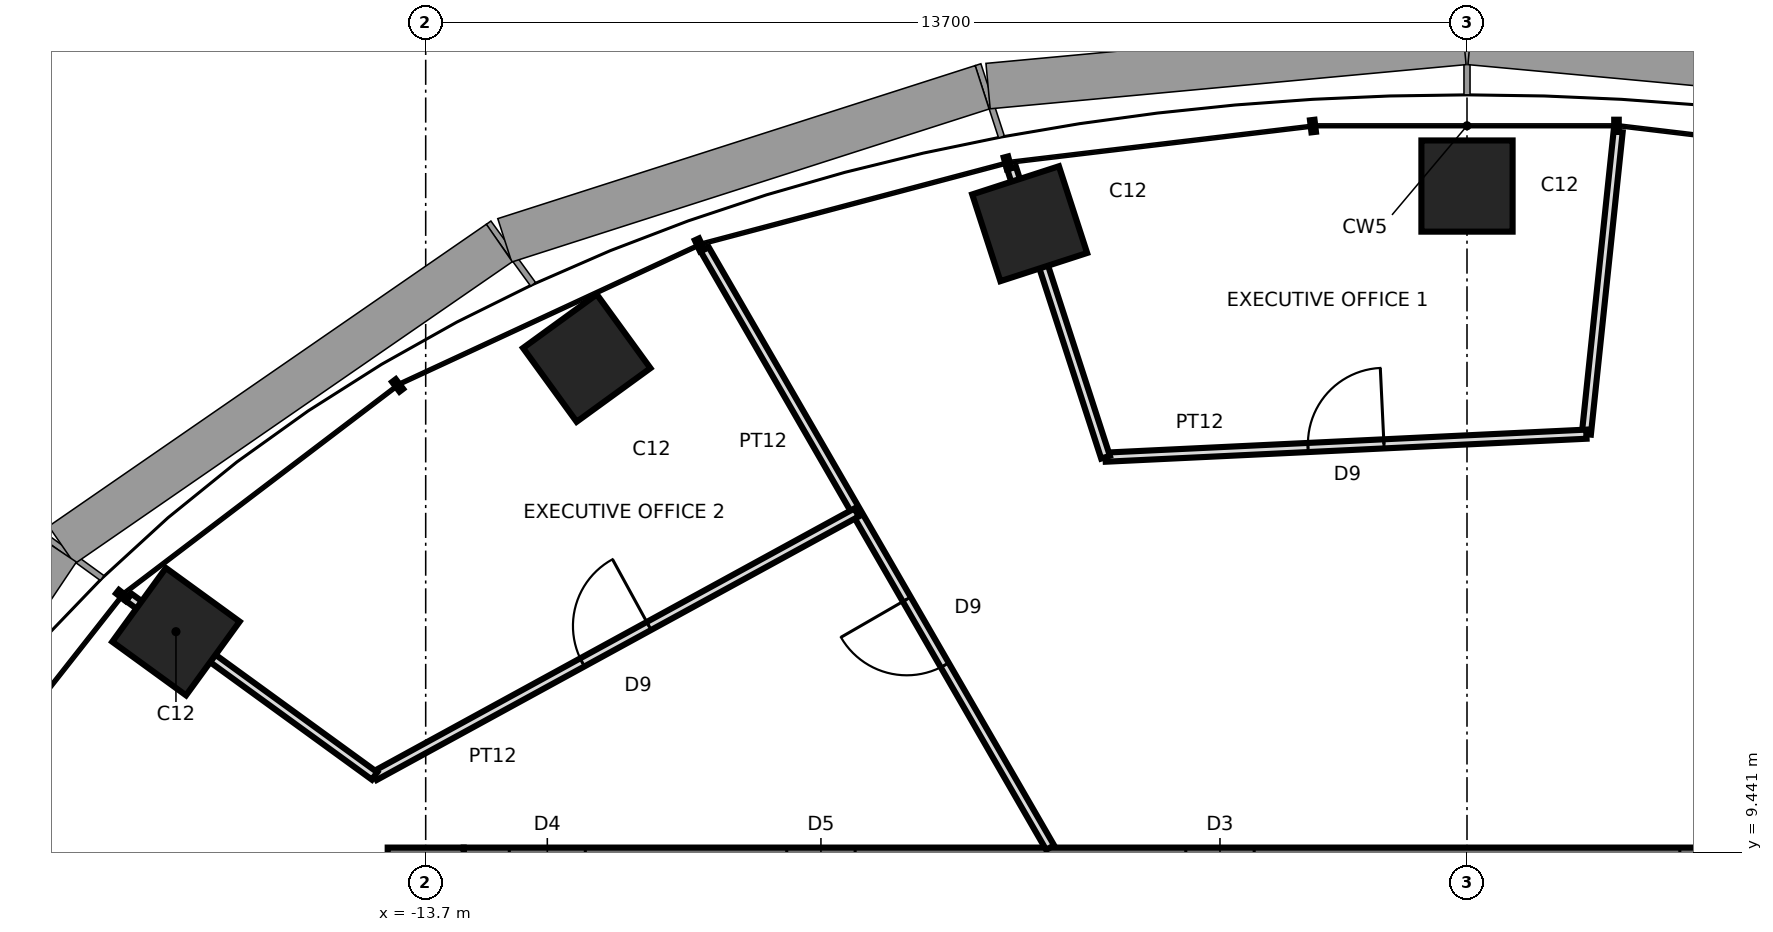
"""IFC4 building model, lengths in metres.
Left out: names, types, materials, properties, quantities, classifications, styles, units other than length and angle.
Written with IfcOpenShell. Run it as: python <this file> out.ifc"""

import sys

from ifc_helpers import new_model, si_unit, direction, frame, frame_2d, origin, origin_2d, place, context, subcontext, project, spatial, rectangle, extrude, element, fill, save


model = new_model("IFC4")
c1 = context("Model", 3, precision=1e-05, world=origin(), true_north=direction((0.0, 1.0)))
c2 = subcontext(c1, "Body", "Model", "MODEL_VIEW")
j1 = project(units=[si_unit("LENGTHUNIT", "METRE"), si_unit("PLANEANGLEUNIT", "RADIAN")], contexts=[c1])
p1 = place(None, origin())
s1 = spatial("IfcSite", under=j1, at=p1, CompositionType="ELEMENT")
p2 = place(p1, origin())
s2 = spatial("IfcBuilding", under=s1, at=p2, CompositionType="ELEMENT")
p3 = place(p2, frame((0.0, 0.0, 256.0)))
s3 = spatial("IfcBuildingStorey", under=s2, at=p3, CompositionType="ELEMENT", Elevation=256.0)
for number, where, z_axis, x_axis in (
    (1, (0.0, 18.204, 0.0), (0.0, 0.0, 1.0), (0.0, 1.0, 0.0)),
    (2, (-5.754, 17.708, 0.0), (0.0, 0.0, 1.0), (-0.309, 0.951, 0.0)),
    (3, (-11.581, 15.94, 0.0), (0.0, 0.0, 1.0), (-0.588, 0.809, 0.0)),
    (4, (-16.986, 12.341, 0.0), (0.0, 0.0, 1.0), (-0.809, 0.588, 0.0)),
):
    element("IfcColumn", number, at=place(p3, frame(where, z_axis=z_axis, x_axis=x_axis)), inside=s3, PredefinedType="COLUMN", context=c2, shape_type="SweptSolid", body=[
        extrude(rectangle(XDim=1.2, YDim=1.2, at=origin_2d()), origin(), (0.0, 0.0, 1.0), 4.2),
    ])
p4 = place(p3, frame((13.2, 9.0, 0.0), z_axis=(0.0, 0.0, 1.0), x_axis=(-1.0, 0.0, 0.0)))
e5 = element("IfcWall", 5, at=p4, inside=s3, PredefinedType="SHEAR", context=c2, shape_type="SweptSolid", body=[
    extrude(rectangle(XDim=26.4, YDim=1.0, at=frame_2d((13.2, 0.0))), origin(), (0.0, 0.0, 1.0), 4.2),
])
p5 = place(p4, frame((2.65, 0.0, 0.0)))
e6 = element("IfcOpeningElement", 6, at=p5, cuts=e5, PredefinedType="OPENING", context=c2, shape_type="SweptSolid", body=[
    extrude(rectangle(XDim=0.9, YDim=2.1, at=frame_2d((0.45, 1.05))), frame((0.0, 0.51, 0.0), z_axis=(0.0, -1.0, 0.0), x_axis=(1.0, 0.0, 0.0)), (0.0, 0.0, 1.0), 1.02),
])
p6 = place(p4, frame((9.5, 0.0, 0.0)))
e7 = element("IfcOpeningElement", 7, at=p6, cuts=e5, PredefinedType="OPENING", context=c2, shape_type="SweptSolid", body=[
    extrude(rectangle(XDim=0.9, YDim=2.1, at=frame_2d((0.45, 1.05))), frame((0.0, 0.51, 0.0), z_axis=(0.0, -1.0, 0.0), x_axis=(1.0, 0.0, 0.0)), (0.0, 0.0, 1.0), 1.02),
])
p7 = place(p4, frame((16.0, 0.0, 0.0)))
e8 = element("IfcOpeningElement", 8, at=p7, cuts=e5, PredefinedType="OPENING", context=c2, shape_type="SweptSolid", body=[
    extrude(rectangle(XDim=0.9, YDim=2.1, at=frame_2d((0.45, 1.05))), frame((0.0, 0.51, 0.0), z_axis=(0.0, -1.0, 0.0), x_axis=(1.0, 0.0, 0.0)), (0.0, 0.0, 1.0), 1.02),
])
p8 = place(p4, frame((21.25, 0.0, 0.0)))
e9 = element("IfcOpeningElement", 9, at=p8, cuts=e5, PredefinedType="OPENING", context=c2, shape_type="SweptSolid", body=[
    extrude(rectangle(XDim=0.9, YDim=2.1, at=frame_2d((0.45, 1.05))), frame((0.0, 0.51, 0.0), z_axis=(0.0, -1.0, 0.0), x_axis=(1.0, 0.0, 0.0)), (0.0, 0.0, 1.0), 1.02),
])
p9 = place(p4, frame((24.8, 0.0, 0.0)))
e10 = element("IfcOpeningElement", 10, at=p9, cuts=e5, PredefinedType="OPENING", context=c2, shape_type="SweptSolid", body=[
    extrude(rectangle(XDim=1.0, YDim=2.1, at=frame_2d((0.5, 1.05))), frame((0.0, 0.51, 0.0), z_axis=(0.0, -1.0, 0.0), x_axis=(1.0, 0.0, 0.0)), (0.0, 0.0, 1.0), 1.02),
])
p10 = place(p3, frame((-13.7, 9.5, 0.0), z_axis=(0.0, 0.0, 1.0), x_axis=(0.0, -1.0, 0.0)))
e11 = element("IfcWall", 11, at=p10, inside=s3, PredefinedType="SHEAR", context=c2, shape_type="SweptSolid", body=[
    extrude(rectangle(XDim=19.0, YDim=1.0, at=frame_2d((9.5, 0.0))), origin(), (0.0, 0.0, 1.0), 4.2),
])
p11 = place(p10, frame((8.6, 0.0, 0.0)))
e12 = element("IfcOpeningElement", 12, at=p11, cuts=e11, PredefinedType="OPENING", context=c2, shape_type="SweptSolid", body=[
    extrude(rectangle(XDim=1.8, YDim=2.4, at=frame_2d((0.9, 1.2))), frame((0.0, 0.51, 0.0), z_axis=(0.0, -1.0, 0.0), x_axis=(1.0, 0.0, 0.0)), (0.0, 0.0, 1.0), 1.02),
])
p12 = place(p3, frame((1.57, 14.939, 0.0), z_axis=(0.0, 0.0, 1.0), x_axis=(0.104487806028, 0.994526167776, 0.0)))
e13 = element("IfcWall", 13, at=p12, inside=s3, PredefinedType="PARTITIONING", context=c2, shape_type="SweptSolid", body=[
    extrude(rectangle(XDim=4.0, YDim=0.12, at=frame_2d((2.0, 0.0))), origin(), (0.0, 0.0, 1.0), 4.04),
])
p13 = place(p3, frame((-4.756, 14.637, 0.0), z_axis=(0.0, 0.0, 1.0), x_axis=(0.998858698779, 0.04776295503, 0.0)))
e14 = element("IfcWall", 14, at=p13, inside=s3, PredefinedType="PARTITIONING", context=c2, shape_type="SweptSolid", body=[
    extrude(rectangle(XDim=6.333, YDim=0.12, at=frame_2d((3.167, 0.0))), origin(), (0.0, 0.0, 1.0), 4.04),
])
p14 = place(p13, frame((2.667, 0.0, 0.0)))
e15 = element("IfcOpeningElement", 15, at=p14, cuts=e14, PredefinedType="OPENING", context=c2, shape_type="SweptSolid", body=[
    extrude(rectangle(XDim=1.0, YDim=2.4, at=frame_2d((0.5, 1.2))), frame((0.0, 0.07, 0.0), z_axis=(0.0, -1.0, 0.0), x_axis=(1.0, 0.0, 0.0)), (0.0, 0.0, 1.0), 0.14),
])
p15 = place(p3, frame((-5.992, 18.441, 0.0), z_axis=(0.0, 0.0, 1.0), x_axis=(0.309022586479, -0.951054699292, 0.0)))
e16 = element("IfcWall", 16, at=p15, inside=s3, PredefinedType="PARTITIONING", context=c2, shape_type="SweptSolid", body=[
    extrude(rectangle(XDim=4.0, YDim=0.12, at=frame_2d((2.0, 0.0))), origin(), (0.0, 0.0, 1.0), 3.24),
])
p16 = place(p3, frame((-5.485, 9.5, 0.0), z_axis=(0.0, 0.0, 1.0), x_axis=(-0.499988999718, 0.866031754707, 0.0)))
e17 = element("IfcWall", 17, at=p16, inside=s3, PredefinedType="PARTITIONING", context=c2, shape_type="SweptSolid", body=[
    extrude(rectangle(XDim=9.092, YDim=0.12, at=frame_2d((4.546, 0.0))), origin(), (0.0, 0.0, 1.0), 4.04),
])
p17 = place(p16, frame((2.772, 0.0, 0.0)))
e18 = element("IfcOpeningElement", 18, at=p17, cuts=e17, PredefinedType="OPENING", context=c2, shape_type="SweptSolid", body=[
    extrude(rectangle(XDim=1.0, YDim=2.4, at=frame_2d((0.5, 1.2))), frame((0.0, 0.07, 0.0), z_axis=(0.0, -1.0, 0.0), x_axis=(1.0, 0.0, 0.0)), (0.0, 0.0, 1.0), 0.14),
])
p18 = place(p3, frame((-14.373, 10.442, 0.0), z_axis=(0.0, 0.0, 1.0), x_axis=(0.877444670923, 0.479677860099, 0.0)))
e19 = element("IfcWall", 19, at=p18, inside=s3, PredefinedType="PARTITIONING", context=c2, shape_type="SweptSolid", body=[
    extrude(rectangle(XDim=7.228, YDim=0.12, at=frame_2d((3.614, 0.0))), origin(), (0.0, 0.0, 1.0), 4.04),
])
p19 = place(p18, frame((3.114, 0.0, 0.0)))
e20 = element("IfcOpeningElement", 20, at=p19, cuts=e19, PredefinedType="OPENING", context=c2, shape_type="SweptSolid", body=[
    extrude(rectangle(XDim=1.0, YDim=2.4, at=frame_2d((0.5, 1.2))), frame((0.0, 0.07, 0.0), z_axis=(0.0, -1.0, 0.0), x_axis=(1.0, 0.0, 0.0)), (0.0, 0.0, 1.0), 0.14),
])
p20 = place(p3, frame((-17.609, 12.793, 0.0), z_axis=(0.0, 0.0, 1.0), x_axis=(0.809026317077, -0.587772420479, 0.0)))
e21 = element("IfcWall", 21, at=p20, inside=s3, PredefinedType="PARTITIONING", context=c2, shape_type="SweptSolid", body=[
    extrude(rectangle(XDim=4.0, YDim=0.12, at=frame_2d((2.0, 0.0))), origin(), (0.0, 0.0, 1.0), 3.24),
])
p21 = place(p14, origin())
e22 = element("IfcDoor", 22, at=p21, inside=s3, OperationType="SINGLE_SWING_RIGHT", PredefinedType="DOOR", context=c2, shape_type="SweptSolid", body=[
    extrude(rectangle(XDim=1.0, YDim=2.4, at=frame_2d((0.5, 1.2))), frame((0.0, 0.025, 0.0), z_axis=(0.0, -1.0, 0.0), x_axis=(1.0, 0.0, 0.0)), (0.0, 0.0, 1.0), 0.05),
])
fill(e15, e22)
p22 = place(p19, origin())
e23 = element("IfcDoor", 23, at=p22, inside=s3, OperationType="SINGLE_SWING_RIGHT", PredefinedType="DOOR", context=c2, shape_type="SweptSolid", body=[
    extrude(rectangle(XDim=1.0, YDim=2.4, at=frame_2d((0.5, 1.2))), frame((0.0, 0.025, 0.0), z_axis=(0.0, -1.0, 0.0), x_axis=(1.0, 0.0, 0.0)), (0.0, 0.0, 1.0), 0.05),
])
fill(e20, e23)
p23 = place(p17, origin())
e24 = element("IfcDoor", 24, at=p23, inside=s3, OperationType="SINGLE_SWING_RIGHT", PredefinedType="DOOR", context=c2, shape_type="SweptSolid", body=[
    extrude(rectangle(XDim=1.0, YDim=2.4, at=frame_2d((0.5, 1.2))), frame((0.0, 0.025, 0.0), z_axis=(0.0, -1.0, 0.0), x_axis=(1.0, 0.0, 0.0)), (0.0, 0.0, 1.0), 0.05),
])
fill(e18, e24)
save(model, sys.argv[1])
